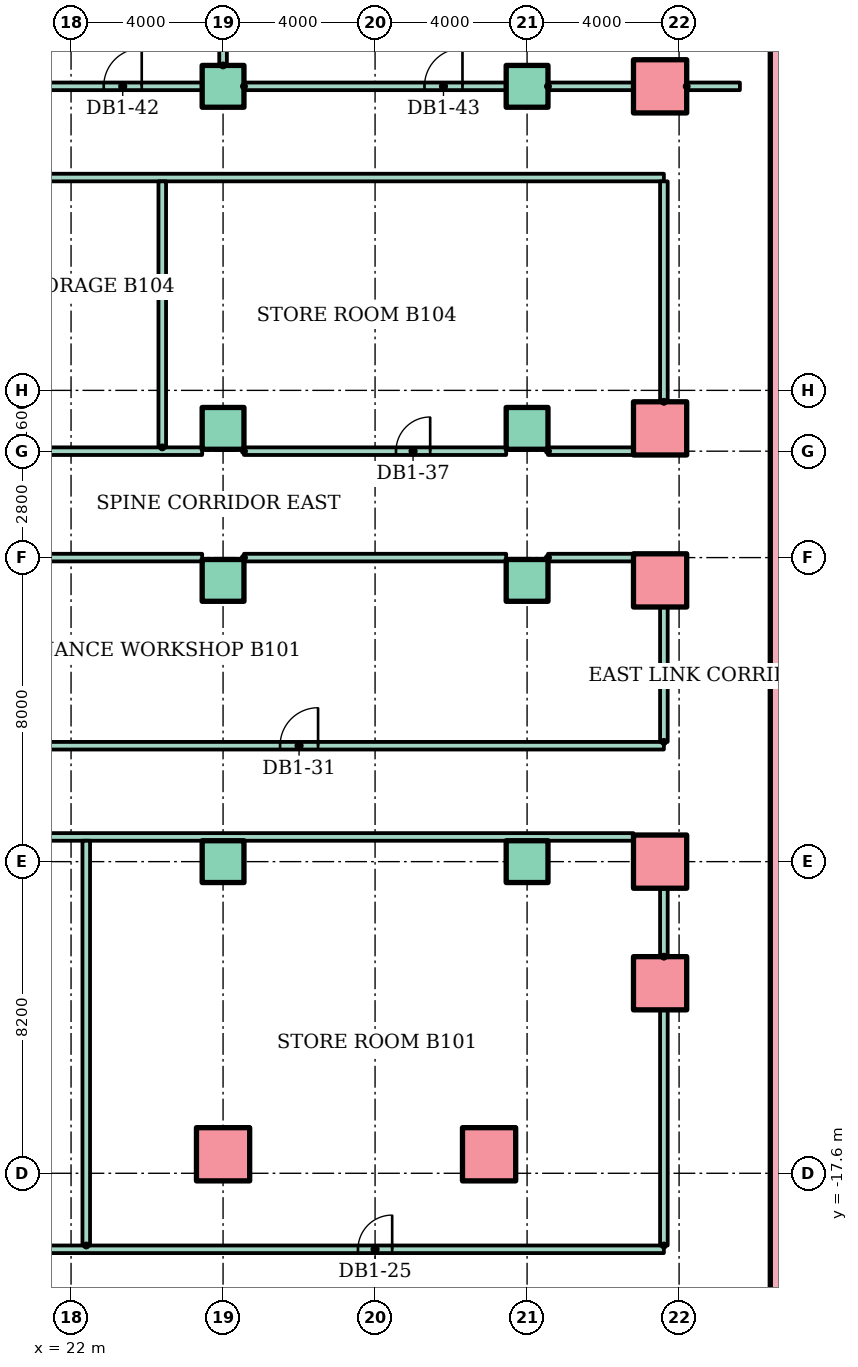
"""IFC4 building model, lengths in metres.
Left out: names, types, materials, properties, quantities, classifications, styles, units other than length and angle.
Written with IfcOpenShell. Run it as: python <this file> out.ifc"""

import sys

from ifc_helpers import new_model, si_unit, direction, frame, frame_2d, origin, origin_2d, place, context, subcontext, project, spatial, rectangle, hollow_rectangle, extrude, element, fill, save


model = new_model("IFC4")
c1 = context("Model", 3, precision=1e-05, world=origin(), true_north=direction((0.0, 1.0)))
c2 = subcontext(c1, "Body", "Model", "MODEL_VIEW")
j1 = project(units=[si_unit("LENGTHUNIT", "METRE"), si_unit("PLANEANGLEUNIT", "RADIAN")], contexts=[c1])
p1 = place(None, origin())
s1 = spatial("IfcSite", under=j1, at=p1, CompositionType="ELEMENT")
p2 = place(p1, origin())
s2 = spatial("IfcBuilding", under=s1, at=p2, CompositionType="ELEMENT")
p3 = place(p2, frame((0.0, 0.0, -5.0)))
s3 = spatial("IfcBuildingStorey", under=s2, at=p3, CompositionType="ELEMENT", Elevation=-5.0)
p4 = place(p3, frame((40.7, -50.4, -0.35), z_axis=(0.0, 0.0, 1.0), x_axis=(0.0, 1.0, 0.0)))
e1 = element("IfcWall", 1, at=p4, inside=s3, PredefinedType="SOLIDWALL", context=c2, shape_type="SweptSolid", body=[
    extrude(rectangle(XDim=70.8, YDim=0.6, at=frame_2d((35.4, 0.0))), origin(), (0.0, 0.0, 1.0), 4.93),
])
for number, where in (
    (2, (26.0, -17.1, 0.0)),
    (3, (33.0, -17.1, 0.0)),
    (4, (37.5, -12.6, 0.0)),
):
    element("IfcColumn", number, at=place(p3, frame(where)), inside=s3, PredefinedType="COLUMN", context=c2, shape_type="SweptSolid", body=[
        extrude(hollow_rectangle(XDim=1.4, YDim=1.4, WallThickness=0.08, at=origin_2d()), origin(), (0.0, 0.0, 1.0), 5.0),
    ])
for number, where in (
    (5, (26.0, -9.4, 0.0)),
    (6, (34.0, -9.4, 0.0)),
):
    element("IfcColumn", number, at=place(p3, frame(where)), inside=s3, PredefinedType="COLUMN", context=c2, shape_type="SweptSolid", body=[
        extrude(rectangle(XDim=1.1, YDim=1.1, at=origin_2d()), origin(), (0.0, 0.0, 1.0), 5.0),
    ])
p5 = place(p3, frame((37.5, -9.4, 0.0)))
e7 = element("IfcColumn", 7, at=p5, inside=s3, PredefinedType="COLUMN", context=c2, shape_type="SweptSolid", body=[
    extrude(hollow_rectangle(XDim=1.4, YDim=1.4, WallThickness=0.08, at=origin_2d()), origin(), (0.0, 0.0, 1.0), 5.0),
])
for number, where in (
    (8, (26.0, -2.0, 0.0)),
    (9, (34.0, -2.0, 0.0)),
):
    element("IfcColumn", number, at=place(p3, frame(where)), inside=s3, PredefinedType="COLUMN", context=c2, shape_type="SweptSolid", body=[
        extrude(rectangle(XDim=1.1, YDim=1.1, at=origin_2d()), origin(), (0.0, 0.0, 1.0), 5.0),
    ])
p6 = place(p3, frame((37.5, -2.0, 0.0)))
e10 = element("IfcColumn", 10, at=p6, inside=s3, PredefinedType="COLUMN", context=c2, shape_type="SweptSolid", body=[
    extrude(hollow_rectangle(XDim=1.4, YDim=1.4, WallThickness=0.08, at=origin_2d()), origin(), (0.0, 0.0, 1.0), 5.0),
])
for number, where in (
    (11, (26.0, 2.0, 0.0)),
    (12, (34.0, 2.0, 0.0)),
):
    element("IfcColumn", number, at=place(p3, frame(where)), inside=s3, PredefinedType="COLUMN", context=c2, shape_type="SweptSolid", body=[
        extrude(rectangle(XDim=1.1, YDim=1.1, at=origin_2d()), origin(), (0.0, 0.0, 1.0), 5.0),
    ])
p7 = place(p3, frame((37.5, 2.0, 0.0)))
e13 = element("IfcColumn", 13, at=p7, inside=s3, PredefinedType="COLUMN", context=c2, shape_type="SweptSolid", body=[
    extrude(hollow_rectangle(XDim=1.4, YDim=1.4, WallThickness=0.08, at=origin_2d()), origin(), (0.0, 0.0, 1.0), 5.0),
])
for number, where in (
    (14, (26.0, 11.0, 0.0)),
    (15, (34.0, 11.0, 0.0)),
):
    element("IfcColumn", number, at=place(p3, frame(where)), inside=s3, PredefinedType="COLUMN", context=c2, shape_type="SweptSolid", body=[
        extrude(rectangle(XDim=1.1, YDim=1.1, at=origin_2d()), origin(), (0.0, 0.0, 1.0), 5.0),
    ])
p8 = place(p3, frame((37.5, 11.0, 0.0)))
e16 = element("IfcColumn", 16, at=p8, inside=s3, PredefinedType="COLUMN", context=c2, shape_type="SweptSolid", body=[
    extrude(hollow_rectangle(XDim=1.4, YDim=1.4, WallThickness=0.08, at=origin_2d()), origin(), (0.0, 0.0, 1.0), 5.0),
])
p9 = place(p3, frame((-37.6, -19.6, 0.0)))
e17 = element("IfcWall", 17, at=p9, inside=s3, PredefinedType="PARTITIONING", context=c2, shape_type="SweptSolid", body=[
    extrude(rectangle(XDim=75.2, YDim=0.2, at=frame_2d((37.6, 0.0))), origin(), (0.0, 0.0, 1.0), 4.58),
])
p10 = place(p9, frame((3.9, 0.0, 0.0)))
e18 = element("IfcOpeningElement", 18, at=p10, cuts=e17, PredefinedType="OPENING", context=c2, shape_type="SweptSolid", body=[
    extrude(rectangle(XDim=1.0, YDim=2.1, at=frame_2d((0.5, 1.05))), frame((0.0, 0.11, 0.0), z_axis=(0.0, -1.0, 0.0), x_axis=(1.0, 0.0, 0.0)), (0.0, 0.0, 1.0), 0.22),
])
p11 = place(p9, frame((15.1, 0.0, 0.0)))
e19 = element("IfcOpeningElement", 19, at=p11, cuts=e17, PredefinedType="OPENING", context=c2, shape_type="SweptSolid", body=[
    extrude(rectangle(XDim=1.0, YDim=2.1, at=frame_2d((0.5, 1.05))), frame((0.0, 0.11, 0.0), z_axis=(0.0, -1.0, 0.0), x_axis=(1.0, 0.0, 0.0)), (0.0, 0.0, 1.0), 0.22),
])
p12 = place(p9, frame((23.9, 0.0, 0.0)))
e20 = element("IfcOpeningElement", 20, at=p12, cuts=e17, PredefinedType="OPENING", context=c2, shape_type="SweptSolid", body=[
    extrude(rectangle(XDim=1.0, YDim=2.1, at=frame_2d((0.5, 1.05))), frame((0.0, 0.11, 0.0), z_axis=(0.0, -1.0, 0.0), x_axis=(1.0, 0.0, 0.0)), (0.0, 0.0, 1.0), 0.22),
])
p13 = place(p9, frame((35.1, 0.0, 0.0)))
e21 = element("IfcOpeningElement", 21, at=p13, cuts=e17, PredefinedType="OPENING", context=c2, shape_type="SweptSolid", body=[
    extrude(rectangle(XDim=1.0, YDim=2.1, at=frame_2d((0.5, 1.05))), frame((0.0, 0.11, 0.0), z_axis=(0.0, -1.0, 0.0), x_axis=(1.0, 0.0, 0.0)), (0.0, 0.0, 1.0), 0.22),
])
p14 = place(p9, frame((44.5, 0.0, 0.0)))
e22 = element("IfcOpeningElement", 22, at=p14, cuts=e17, PredefinedType="OPENING", context=c2, shape_type="SweptSolid", body=[
    extrude(rectangle(XDim=1.0, YDim=2.1, at=frame_2d((0.5, 1.05))), frame((0.0, 0.11, 0.0), z_axis=(0.0, -1.0, 0.0), x_axis=(1.0, 0.0, 0.0)), (0.0, 0.0, 1.0), 0.22),
])
p15 = place(p9, frame((54.5, 0.0, 0.0)))
e23 = element("IfcOpeningElement", 23, at=p15, cuts=e17, PredefinedType="OPENING", context=c2, shape_type="SweptSolid", body=[
    extrude(rectangle(XDim=1.0, YDim=2.1, at=frame_2d((0.5, 1.05))), frame((0.0, 0.11, 0.0), z_axis=(0.0, -1.0, 0.0), x_axis=(1.0, 0.0, 0.0)), (0.0, 0.0, 1.0), 0.22),
])
p16 = place(p9, frame((67.15, 0.0, 0.0)))
e24 = element("IfcOpeningElement", 24, at=p16, cuts=e17, PredefinedType="OPENING", context=c2, shape_type="SweptSolid", body=[
    extrude(rectangle(XDim=0.9, YDim=2.1, at=frame_2d((0.45, 1.05))), frame((0.0, 0.11, 0.0), z_axis=(0.0, -1.0, 0.0), x_axis=(1.0, 0.0, 0.0)), (0.0, 0.0, 1.0), 0.22),
])
p17 = place(p3, frame((-36.8, -8.75, 0.0)))
e25 = element("IfcWall", 25, at=p17, inside=s3, PredefinedType="PARTITIONING", context=c2, shape_type="SweptSolid", body=[
    extrude(rectangle(XDim=73.6, YDim=0.2, at=frame_2d((36.8, 0.0))), origin(), (0.0, 0.0, 1.0), 4.58),
])
p18 = place(p3, frame((-37.6, -6.35, 0.0)))
e26 = element("IfcWall", 26, at=p18, inside=s3, PredefinedType="PARTITIONING", context=c2, shape_type="SweptSolid", body=[
    extrude(rectangle(XDim=75.2, YDim=0.2, at=frame_2d((37.6, 0.0))), origin(), (0.0, 0.0, 1.0), 4.58),
])
p19 = place(p18, frame((4.5, 0.0, 0.0)))
e27 = element("IfcOpeningElement", 27, at=p19, cuts=e26, PredefinedType="OPENING", context=c2, shape_type="SweptSolid", body=[
    extrude(rectangle(XDim=1.0, YDim=2.1, at=frame_2d((0.5, 1.05))), frame((0.0, 0.11, 0.0), z_axis=(0.0, -1.0, 0.0), x_axis=(1.0, 0.0, 0.0)), (0.0, 0.0, 1.0), 0.22),
])
p20 = place(p18, frame((15.3, 0.0, 0.0)))
e28 = element("IfcOpeningElement", 28, at=p20, cuts=e26, PredefinedType="OPENING", context=c2, shape_type="SweptSolid", body=[
    extrude(rectangle(XDim=1.4, YDim=2.1, at=frame_2d((0.7, 1.05))), frame((0.0, 0.11, 0.0), z_axis=(0.0, -1.0, 0.0), x_axis=(1.0, 0.0, 0.0)), (0.0, 0.0, 1.0), 0.22),
])
p21 = place(p18, frame((26.5, 0.0, 0.0)))
e29 = element("IfcOpeningElement", 29, at=p21, cuts=e26, PredefinedType="OPENING", context=c2, shape_type="SweptSolid", body=[
    extrude(rectangle(XDim=1.0, YDim=2.1, at=frame_2d((0.5, 1.05))), frame((0.0, 0.11, 0.0), z_axis=(0.0, -1.0, 0.0), x_axis=(1.0, 0.0, 0.0)), (0.0, 0.0, 1.0), 0.22),
])
p22 = place(p18, frame((36.55, 0.0, 0.0)))
e30 = element("IfcOpeningElement", 30, at=p22, cuts=e26, PredefinedType="OPENING", context=c2, shape_type="SweptSolid", body=[
    extrude(rectangle(XDim=0.9, YDim=2.1, at=frame_2d((0.45, 1.05))), frame((0.0, 0.11, 0.0), z_axis=(0.0, -1.0, 0.0), x_axis=(1.0, 0.0, 0.0)), (0.0, 0.0, 1.0), 0.22),
])
p23 = place(p18, frame((48.55, 0.0, 0.0)))
e31 = element("IfcOpeningElement", 31, at=p23, cuts=e26, PredefinedType="OPENING", context=c2, shape_type="SweptSolid", body=[
    extrude(rectangle(XDim=0.9, YDim=2.1, at=frame_2d((0.45, 1.05))), frame((0.0, 0.11, 0.0), z_axis=(0.0, -1.0, 0.0), x_axis=(1.0, 0.0, 0.0)), (0.0, 0.0, 1.0), 0.22),
])
p24 = place(p18, frame((65.1, 0.0, 0.0)))
e32 = element("IfcOpeningElement", 32, at=p24, cuts=e26, PredefinedType="OPENING", context=c2, shape_type="SweptSolid", body=[
    extrude(rectangle(XDim=1.0, YDim=2.1, at=frame_2d((0.5, 1.05))), frame((0.0, 0.11, 0.0), z_axis=(0.0, -1.0, 0.0), x_axis=(1.0, 0.0, 0.0)), (0.0, 0.0, 1.0), 0.22),
])
for number, where in (
    (33, (18.55, -1.4, 0.0)),
    (34, (26.55, -1.4, 0.0)),
):
    element("IfcWall", number, at=place(p3, frame(where)), inside=s3, PredefinedType="PARTITIONING", context=c2, shape_type="SweptSolid", body=[
        extrude(rectangle(XDim=6.9, YDim=0.2, at=frame_2d((3.45, 0.0))), origin(), (0.0, 0.0, 1.0), 4.58),
    ])
p25 = place(p3, frame((34.55, -1.4, 0.0)))
e35 = element("IfcWall", 35, at=p25, inside=s3, PredefinedType="PARTITIONING", context=c2, shape_type="SweptSolid", body=[
    extrude(rectangle(XDim=2.25, YDim=0.2, at=frame_2d((1.125, 0.0))), origin(), (0.0, 0.0, 1.0), 4.58),
])
p26 = place(p3, frame((18.55, 1.4, 0.0)))
e36 = element("IfcWall", 36, at=p26, inside=s3, PredefinedType="PARTITIONING", context=c2, shape_type="SweptSolid", body=[
    extrude(rectangle(XDim=6.9, YDim=0.2, at=frame_2d((3.45, 0.0))), origin(), (0.0, 0.0, 1.0), 4.58),
])
p27 = place(p26, frame((1.35, 0.0, 0.0)))
e37 = element("IfcOpeningElement", 37, at=p27, cuts=e36, PredefinedType="OPENING", context=c2, shape_type="SweptSolid", body=[
    extrude(rectangle(XDim=1.0, YDim=2.1, at=frame_2d((0.5, 1.05))), frame((0.0, 0.11, 0.0), z_axis=(0.0, -1.0, 0.0), x_axis=(1.0, 0.0, 0.0)), (0.0, 0.0, 1.0), 0.22),
])
p28 = place(p3, frame((26.55, 1.4, 0.0)))
e38 = element("IfcWall", 38, at=p28, inside=s3, PredefinedType="PARTITIONING", context=c2, shape_type="SweptSolid", body=[
    extrude(rectangle(XDim=6.9, YDim=0.2, at=frame_2d((3.45, 0.0))), origin(), (0.0, 0.0, 1.0), 4.58),
])
p29 = place(p28, frame((4.0, 0.0, 0.0)))
e39 = element("IfcOpeningElement", 39, at=p29, cuts=e38, PredefinedType="OPENING", context=c2, shape_type="SweptSolid", body=[
    extrude(rectangle(XDim=0.9, YDim=2.1, at=frame_2d((0.45, 1.05))), frame((0.0, 0.11, 0.0), z_axis=(0.0, -1.0, 0.0), x_axis=(1.0, 0.0, 0.0)), (0.0, 0.0, 1.0), 0.22),
])
p30 = place(p3, frame((34.55, 1.4, 0.0)))
e40 = element("IfcWall", 40, at=p30, inside=s3, PredefinedType="PARTITIONING", context=c2, shape_type="SweptSolid", body=[
    extrude(rectangle(XDim=2.25, YDim=0.2, at=frame_2d((1.125, 0.0))), origin(), (0.0, 0.0, 1.0), 4.58),
])
p31 = place(p3, frame((16.3, 8.6, 0.0)))
e41 = element("IfcWall", 41, at=p31, inside=s3, PredefinedType="PARTITIONING", context=c2, shape_type="SweptSolid", body=[
    extrude(rectangle(XDim=21.3, YDim=0.2, at=frame_2d((10.65, 0.0))), origin(), (0.0, 0.0, 1.0), 4.58),
])
p32 = place(p31, frame((3.6, 0.0, 0.0)))
e42 = element("IfcOpeningElement", 42, at=p32, cuts=e41, PredefinedType="OPENING", context=c2, shape_type="SweptSolid", body=[
    extrude(rectangle(XDim=1.0, YDim=2.1, at=frame_2d((0.5, 1.05))), frame((0.0, 0.11, 0.0), z_axis=(0.0, -1.0, 0.0), x_axis=(1.0, 0.0, 0.0)), (0.0, 0.0, 1.0), 0.22),
])
p33 = place(p3, frame((18.55, 11.0, 0.0)))
e43 = element("IfcWall", 43, at=p33, inside=s3, PredefinedType="PARTITIONING", context=c2, shape_type="SweptSolid", body=[
    extrude(rectangle(XDim=6.9, YDim=0.2, at=frame_2d((3.45, 0.0))), origin(), (0.0, 0.0, 1.0), 4.58),
])
p34 = place(p33, frame((0.35, 0.0, 0.0)))
e44 = element("IfcOpeningElement", 44, at=p34, cuts=e43, PredefinedType="OPENING", context=c2, shape_type="SweptSolid", body=[
    extrude(rectangle(XDim=1.0, YDim=2.1, at=frame_2d((0.5, 1.05))), frame((0.0, 0.11, 0.0), z_axis=(0.0, -1.0, 0.0), x_axis=(1.0, 0.0, 0.0)), (0.0, 0.0, 1.0), 0.22),
])
p35 = place(p33, frame((4.31, 0.0, 0.0)))
e45 = element("IfcOpeningElement", 45, at=p35, cuts=e43, PredefinedType="OPENING", context=c2, shape_type="SweptSolid", body=[
    extrude(rectangle(XDim=1.0, YDim=2.1, at=frame_2d((0.5, 1.05))), frame((0.0, 0.11, 0.0), z_axis=(0.0, -1.0, 0.0), x_axis=(1.0, 0.0, 0.0)), (0.0, 0.0, 1.0), 0.22),
])
p36 = place(p3, frame((26.55, 11.0, 0.0)))
e46 = element("IfcWall", 46, at=p36, inside=s3, PredefinedType="PARTITIONING", context=c2, shape_type="SweptSolid", body=[
    extrude(rectangle(XDim=6.9, YDim=0.2, at=frame_2d((3.45, 0.0))), origin(), (0.0, 0.0, 1.0), 4.58),
])
p37 = place(p36, frame((4.75, 0.0, 0.0)))
e47 = element("IfcOpeningElement", 47, at=p37, cuts=e46, PredefinedType="OPENING", context=c2, shape_type="SweptSolid", body=[
    extrude(rectangle(XDim=1.0, YDim=2.1, at=frame_2d((0.5, 1.05))), frame((0.0, 0.11, 0.0), z_axis=(0.0, -1.0, 0.0), x_axis=(1.0, 0.0, 0.0)), (0.0, 0.0, 1.0), 0.22),
])
p38 = place(p3, frame((34.55, 11.0, 0.0)))
e48 = element("IfcWall", 48, at=p38, inside=s3, PredefinedType="PARTITIONING", context=c2, shape_type="SweptSolid", body=[
    extrude(rectangle(XDim=2.25, YDim=0.2, at=frame_2d((1.125, 0.0))), origin(), (0.0, 0.0, 1.0), 4.58),
])
p39 = place(p3, frame((38.2, 11.0, 0.0)))
e49 = element("IfcWall", 49, at=p39, inside=s3, PredefinedType="PARTITIONING", context=c2, shape_type="SweptSolid", body=[
    extrude(rectangle(XDim=1.4, YDim=0.2, at=frame_2d((0.7, 0.0))), origin(), (0.0, 0.0, 1.0), 4.58),
])
p40 = place(p3, frame((22.4, -19.5, 0.0), z_axis=(0.0, 0.0, 1.0), x_axis=(0.0, 1.0, 0.0)))
e50 = element("IfcWall", 50, at=p40, inside=s3, PredefinedType="PARTITIONING", context=c2, shape_type="SweptSolid", body=[
    extrude(rectangle(XDim=10.65, YDim=0.2, at=frame_2d((5.325, 0.0))), origin(), (0.0, 0.0, 1.0), 4.58),
])
p41 = place(p3, frame((24.4, 1.5, 0.0), z_axis=(0.0, 0.0, 1.0), x_axis=(0.0, 1.0, 0.0)))
e51 = element("IfcWall", 51, at=p41, inside=s3, PredefinedType="PARTITIONING", context=c2, shape_type="SweptSolid", body=[
    extrude(rectangle(XDim=7.0, YDim=0.2, at=frame_2d((3.5, 0.0))), origin(), (0.0, 0.0, 1.0), 4.58),
])
p42 = place(p3, frame((26.0, 11.55, 0.0), z_axis=(0.0, 0.0, 1.0), x_axis=(0.0, 1.0, 0.0)))
e52 = element("IfcWall", 52, at=p42, inside=s3, PredefinedType="PARTITIONING", context=c2, shape_type="SweptSolid", body=[
    extrude(rectangle(XDim=7.25, YDim=0.2, at=frame_2d((3.625, 0.0))), origin(), (0.0, 0.0, 1.0), 4.58),
])
p43 = place(p3, frame((37.6, -19.5, 0.0), z_axis=(0.0, 0.0, 1.0), x_axis=(0.0, 1.0, 0.0)))
e53 = element("IfcWall", 53, at=p43, inside=s3, PredefinedType="PARTITIONING", context=c2, shape_type="SweptSolid", body=[
    extrude(rectangle(XDim=6.2, YDim=0.2, at=frame_2d((3.1, 0.0))), origin(), (0.0, 0.0, 1.0), 4.58),
])
p44 = place(p3, frame((37.6, -11.9, 0.0), z_axis=(0.0, 0.0, 1.0), x_axis=(0.0, 1.0, 0.0)))
e54 = element("IfcWall", 54, at=p44, inside=s3, PredefinedType="PARTITIONING", context=c2, shape_type="SweptSolid", body=[
    extrude(rectangle(XDim=1.8, YDim=0.2, at=frame_2d((0.9, 0.0))), origin(), (0.0, 0.0, 1.0), 4.58),
])
p45 = place(p3, frame((37.6, -6.25, 0.0), z_axis=(0.0, 0.0, 1.0), x_axis=(0.0, 1.0, 0.0)))
e55 = element("IfcWall", 55, at=p45, inside=s3, PredefinedType="PARTITIONING", context=c2, shape_type="SweptSolid", body=[
    extrude(rectangle(XDim=3.55, YDim=0.2, at=frame_2d((1.775, 0.0))), origin(), (0.0, 0.0, 1.0), 4.58),
])
p46 = place(p3, frame((37.6, 2.7, 0.0), z_axis=(0.0, 0.0, 1.0), x_axis=(0.0, 1.0, 0.0)))
e56 = element("IfcWall", 56, at=p46, inside=s3, PredefinedType="PARTITIONING", context=c2, shape_type="SweptSolid", body=[
    extrude(rectangle(XDim=5.8, YDim=0.2, at=frame_2d((2.9, 0.0))), origin(), (0.0, 0.0, 1.0), 4.58),
])
p47 = place(p16, origin())
e57 = element("IfcDoor", 57, at=p47, inside=s3, OperationType="SINGLE_SWING_RIGHT", PredefinedType="DOOR", context=c2, shape_type="SweptSolid", body=[
    extrude(rectangle(XDim=0.9, YDim=2.1, at=frame_2d((0.45, 1.05))), frame((0.0, 0.025, 0.0), z_axis=(0.0, -1.0, 0.0), x_axis=(1.0, 0.0, 0.0)), (0.0, 0.0, 1.0), 0.05),
])
fill(e24, e57)
p48 = place(p24, origin())
e58 = element("IfcDoor", 58, at=p48, inside=s3, OperationType="SINGLE_SWING_RIGHT", PredefinedType="DOOR", context=c2, shape_type="SweptSolid", body=[
    extrude(rectangle(XDim=1.0, YDim=2.1, at=frame_2d((0.5, 1.05))), frame((0.0, 0.025, 0.0), z_axis=(0.0, -1.0, 0.0), x_axis=(1.0, 0.0, 0.0)), (0.0, 0.0, 1.0), 0.05),
])
fill(e32, e58)
p49 = place(p29, origin())
e59 = element("IfcDoor", 59, at=p49, inside=s3, OperationType="SINGLE_SWING_RIGHT", PredefinedType="DOOR", context=c2, shape_type="SweptSolid", body=[
    extrude(rectangle(XDim=0.9, YDim=2.1, at=frame_2d((0.45, 1.05))), frame((0.0, 0.025, 0.0), z_axis=(0.0, -1.0, 0.0), x_axis=(1.0, 0.0, 0.0)), (0.0, 0.0, 1.0), 0.05),
])
fill(e39, e59)
p50 = place(p35, origin())
e60 = element("IfcDoor", 60, at=p50, inside=s3, OperationType="SINGLE_SWING_RIGHT", PredefinedType="DOOR", context=c2, shape_type="SweptSolid", body=[
    extrude(rectangle(XDim=1.0, YDim=2.1, at=frame_2d((0.5, 1.05))), frame((0.0, 0.025, 0.0), z_axis=(0.0, -1.0, 0.0), x_axis=(1.0, 0.0, 0.0)), (0.0, 0.0, 1.0), 0.05),
])
fill(e45, e60)
p51 = place(p37, origin())
e61 = element("IfcDoor", 61, at=p51, inside=s3, OperationType="SINGLE_SWING_RIGHT", PredefinedType="DOOR", context=c2, shape_type="SweptSolid", body=[
    extrude(rectangle(XDim=1.0, YDim=2.1, at=frame_2d((0.5, 1.05))), frame((0.0, 0.025, 0.0), z_axis=(0.0, -1.0, 0.0), x_axis=(1.0, 0.0, 0.0)), (0.0, 0.0, 1.0), 0.05),
])
fill(e47, e61)
save(model, sys.argv[1])
